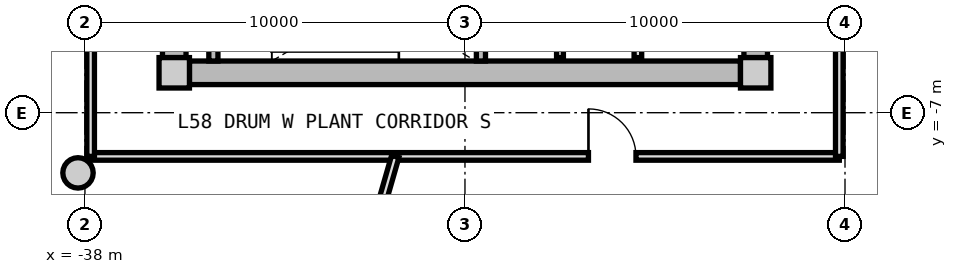
"""IFC4 building model, lengths in metres.
Left out: names, types, materials, properties, quantities, classifications, styles, units other than length and angle.
Written with IfcOpenShell. Run it as: python <this file> out.ifc"""

import sys

from ifc_helpers import new_model, si_unit, direction, frame, frame_2d, origin, origin_2d, place, context, subcontext, project, spatial, rectangle, circle, extrude, source, transform, mapped, element, fill, save


model = new_model("IFC4")
c1 = context("Model", 3, precision=1e-05, world=origin(), true_north=direction((0.0, 1.0)))
c2 = subcontext(c1, "Body", "Model", "MODEL_VIEW")
j1 = project(units=[si_unit("LENGTHUNIT", "METRE"), si_unit("PLANEANGLEUNIT", "RADIAN")], contexts=[c1])
p1 = place(None, origin())
s1 = spatial("IfcSite", under=j1, at=p1, CompositionType="ELEMENT")
p2 = place(p1, origin())
s2 = spatial("IfcBuilding", under=s1, at=p2, CompositionType="ELEMENT")
p3 = place(p2, frame((0.0, 0.0, 186.15)))
s3 = spatial("IfcBuildingStorey", under=s2, at=p3, CompositionType="ELEMENT", Elevation=186.15)
m1 = source(origin(), c2, "Body", "SweptSolid", [
    extrude(rectangle(XDim=0.8, YDim=0.8, at=origin_2d()), origin(), (0.0, 0.0, 1.0), 4.5),
])
for number, where, z_axis, x_axis in (
    (1, (-35.65, -5.95, 0.0), (0.0, 0.0, 1.0), (1.0, 0.0, 0.0)),
    (2, (-20.35, -5.95, 0.0), (0.0, 0.0, 1.0), (1.0, 0.0, 0.0)),
):
    element("IfcColumn", number, at=place(p3, frame(where, z_axis=z_axis, x_axis=x_axis)), inside=s3, PredefinedType="COLUMN", context=c2, shape_type="MappedRepresentation", body=[
        mapped(m1, transform((0.0, 0.0, 0.0), x_axis=(1.0, 0.0, 0.0), y_axis=(0.0, 1.0, 0.0), z_axis=(0.0, 0.0, 1.0), scale=1.0)),
    ])
m2 = source(origin(), c2, "Body", "SweptSolid", [
    extrude(rectangle(XDim=14.5, YDim=0.62, at=frame_2d((7.25, 0.0))), origin(), (0.0, 0.0, 1.0), 4.08),
])
p4 = place(p3, frame((-20.75, -5.95, 0.0), z_axis=(0.0, 0.0, 1.0), x_axis=(-1.0, 0.0, 0.0)))
e3 = element("IfcWall", 3, at=p4, inside=s3, PredefinedType="SHEAR", context=c2, shape_type="MappedRepresentation", body=[
    mapped(m2, transform((0.0, 0.0, 0.0), x_axis=(1.0, 0.0, 0.0), y_axis=(0.0, 1.0, 0.0), z_axis=(0.0, 0.0, 1.0), scale=1.0)),
])
m3 = source(origin(), c2, "Body", "SweptSolid", [
    extrude(rectangle(XDim=11.1, YDim=0.62, at=frame_2d((5.55, 0.0))), origin(), (0.0, 0.0, 1.0), 4.08),
])
p5 = place(p3, frame((-35.65, -5.55, 0.0), z_axis=(0.0, 0.0, 1.0), x_axis=(0.0, 1.0, 0.0)))
e4 = element("IfcWall", 4, at=p5, inside=s3, PredefinedType="SHEAR", context=c2, shape_type="MappedRepresentation", body=[
    mapped(m3, transform((0.0, 0.0, 0.0), x_axis=(1.0, 0.0, 0.0), y_axis=(0.0, 1.0, 0.0), z_axis=(0.0, 0.0, 1.0), scale=1.0)),
])
p6 = place(p5, frame((3.8, 0.0, 0.0)))
e5 = element("IfcOpeningElement", 5, at=p6, cuts=e4, PredefinedType="OPENING", context=c2, shape_type="SweptSolid", body=[
    extrude(rectangle(XDim=1.2, YDim=2.15, at=frame_2d((0.6, 1.075))), frame((0.0, 0.32, 0.0), z_axis=(0.0, -1.0, 0.0), x_axis=(1.0, 0.0, 0.0)), (0.0, 0.0, 1.0), 0.64),
])
p7 = place(p3, frame((-20.35, 5.55, 0.0), z_axis=(0.0, 0.0, 1.0), x_axis=(0.0, -1.0, 0.0)))
e6 = element("IfcWall", 6, at=p7, inside=s3, PredefinedType="SHEAR", context=c2, shape_type="MappedRepresentation", body=[
    mapped(m3, transform((0.0, 0.0, 0.0), x_axis=(1.0, 0.0, 0.0), y_axis=(0.0, 1.0, 0.0), z_axis=(0.0, 0.0, 1.0), scale=1.0)),
])
p8 = place(p7, frame((5.65, 0.0, 0.0)))
e7 = element("IfcOpeningElement", 7, at=p8, cuts=e6, PredefinedType="OPENING", context=c2, shape_type="SweptSolid", body=[
    extrude(rectangle(XDim=1.2, YDim=2.15, at=frame_2d((0.6, 1.075))), frame((0.0, 0.32, 0.0), z_axis=(0.0, -1.0, 0.0), x_axis=(1.0, 0.0, 0.0)), (0.0, 0.0, 1.0), 0.64),
])
p9 = place(p7, frame((9.3, 0.0, 0.0)))
e8 = element("IfcOpeningElement", 8, at=p9, cuts=e6, PredefinedType="OPENING", context=c2, shape_type="SweptSolid", body=[
    extrude(rectangle(XDim=1.0, YDim=2.1, at=frame_2d((0.5, 1.05))), frame((0.0, 0.32, 0.0), z_axis=(0.0, -1.0, 0.0), x_axis=(1.0, 0.0, 0.0)), (0.0, 0.0, 1.0), 0.64),
])
m4 = source(origin(), c2, "Body", "SweptSolid", [
    extrude(circle(Radius=0.4, at=origin_2d()), origin(), (0.0, 0.0, 1.0), 4.08),
])
p10 = place(p3, frame((-38.183, -8.584, 0.0), z_axis=(0.0, 0.0, 1.0), x_axis=(1.0, 0.0, 0.0)))
e9 = element("IfcColumn", 9, at=p10, inside=s3, PredefinedType="COLUMN", context=c2, shape_type="MappedRepresentation", body=[
    mapped(m4, transform((0.0, 0.0, 0.0), x_axis=(1.0, 0.0, 0.0), y_axis=(0.0, 1.0, 0.0), z_axis=(0.0, 0.0, 1.0), scale=1.0)),
])
m5 = source(origin(), c2, "Body", "SweptSolid", [
    extrude(rectangle(XDim=3.19, YDim=0.24, at=frame_2d((1.595, 0.0))), origin(), (0.0, 0.0, 1.0), 4.08),
])
for number, where, z_axis, x_axis in (
    (10, (-34.62, -5.64, 0.0), (0.0, 0.0, 1.0), (0.0, 1.0, 0.0)),
    (11, (-27.58, -5.64, 0.0), (0.0, 0.0, 1.0), (0.0, 1.0, 0.0)),
):
    element("IfcWall", number, at=place(p3, frame(where, z_axis=z_axis, x_axis=x_axis)), inside=s3, PredefinedType="PARTITIONING", context=c2, shape_type="MappedRepresentation", body=[
        mapped(m5, transform((0.0, 0.0, 0.0), x_axis=(1.0, 0.0, 0.0), y_axis=(0.0, 1.0, 0.0), z_axis=(0.0, 0.0, 1.0), scale=1.0)),
    ])
m6 = source(origin(), c2, "Body", "SweptSolid", [
    extrude(rectangle(XDim=3.8, YDim=0.2, at=frame_2d((1.9, 0.0))), origin(), (0.0, 0.0, 1.0), 4.065),
])
p11 = place(p3, frame((-23.45, -5.55, 0.0), z_axis=(0.0, 0.0, 1.0), x_axis=(0.0, 1.0, 0.0)))
e12 = element("IfcWall", 12, at=p11, inside=s3, PredefinedType="PARTITIONING", context=c2, shape_type="MappedRepresentation", body=[
    mapped(m6, transform((0.0, 0.0, 0.0), x_axis=(1.0, 0.0, 0.0), y_axis=(0.0, 1.0, 0.0), z_axis=(0.0, 0.0, 1.0), scale=1.0)),
])
m7 = source(origin(), c2, "Body", "SweptSolid", [
    extrude(rectangle(XDim=4.2, YDim=0.18, at=frame_2d((2.1, 0.0))), origin(), (0.0, 0.0, 1.0), 4.065),
])
p12 = place(p3, frame((-25.5, -5.55, 0.0), z_axis=(0.0, 0.0, 1.0), x_axis=(0.0, 1.0, 0.0)))
e13 = element("IfcWall", 13, at=p12, inside=s3, PredefinedType="PARTITIONING", context=c2, shape_type="MappedRepresentation", body=[
    mapped(m7, transform((0.0, 0.0, 0.0), x_axis=(1.0, 0.0, 0.0), y_axis=(0.0, 1.0, 0.0), z_axis=(0.0, 0.0, 1.0), scale=1.0)),
])
m8 = source(origin(), c2, "Body", "SweptSolid", [
    extrude(rectangle(XDim=19.7, YDim=0.2, at=frame_2d((9.85, 0.0))), origin(), (0.0, 0.0, 1.0), 4.065),
])
p13 = place(p3, frame((-18.15, -8.15, 0.0), z_axis=(0.0, 0.0, 1.0), x_axis=(-1.0, 0.0, 0.0)))
e14 = element("IfcWall", 14, at=p13, inside=s3, PredefinedType="PARTITIONING", context=c2, shape_type="MappedRepresentation", body=[
    mapped(m8, transform((0.0, 0.0, 0.0), x_axis=(1.0, 0.0, 0.0), y_axis=(0.0, 1.0, 0.0), z_axis=(0.0, 0.0, 1.0), scale=1.0)),
])
p14 = place(p13, frame((5.35, 0.0, 0.0)))
e15 = element("IfcOpeningElement", 15, at=p14, cuts=e14, PredefinedType="OPENING", context=c2, shape_type="SweptSolid", body=[
    extrude(rectangle(XDim=1.25, YDim=2.2, at=frame_2d((0.625, 1.1))), frame((0.0, 0.11, 0.0), z_axis=(0.0, -1.0, 0.0), x_axis=(1.0, 0.0, 0.0)), (0.0, 0.0, 1.0), 0.22),
])
m9 = source(origin(), c2, "Body", "SweptSolid", [
    extrude(rectangle(XDim=16.3, YDim=0.2, at=frame_2d((8.15, 0.0))), origin(), (0.0, 0.0, 1.0), 4.065),
])
p15 = place(p3, frame((-37.85, -8.15, 0.0), z_axis=(0.0, 0.0, 1.0), x_axis=(0.0, 1.0, 0.0)))
e16 = element("IfcWall", 16, at=p15, inside=s3, PredefinedType="PARTITIONING", context=c2, shape_type="MappedRepresentation", body=[
    mapped(m9, transform((0.0, 0.0, 0.0), x_axis=(1.0, 0.0, 0.0), y_axis=(0.0, 1.0, 0.0), z_axis=(0.0, 0.0, 1.0), scale=1.0)),
])
p16 = place(p15, frame((5.972, 0.0, 0.0)))
e17 = element("IfcOpeningElement", 17, at=p16, cuts=e16, PredefinedType="OPENING", context=c2, shape_type="SweptSolid", body=[
    extrude(rectangle(XDim=1.0, YDim=2.1, at=frame_2d((0.5, 1.05))), frame((0.0, 0.11, 0.0), z_axis=(0.0, -1.0, 0.0), x_axis=(1.0, 0.0, 0.0)), (0.0, 0.0, 1.0), 0.22),
])
p17 = place(p3, frame((-18.15, 8.15, 0.0), z_axis=(0.0, 0.0, 1.0), x_axis=(0.0, -1.0, 0.0)))
e18 = element("IfcWall", 18, at=p17, inside=s3, PredefinedType="PARTITIONING", context=c2, shape_type="MappedRepresentation", body=[
    mapped(m9, transform((0.0, 0.0, 0.0), x_axis=(1.0, 0.0, 0.0), y_axis=(0.0, 1.0, 0.0), z_axis=(0.0, 0.0, 1.0), scale=1.0)),
])
p18 = place(p17, frame((3.939, 0.0, 0.0)))
e19 = element("IfcOpeningElement", 19, at=p18, cuts=e18, PredefinedType="OPENING", context=c2, shape_type="SweptSolid", body=[
    extrude(rectangle(XDim=1.0, YDim=2.1, at=frame_2d((0.5, 1.05))), frame((0.0, 0.11, 0.0), z_axis=(0.0, -1.0, 0.0), x_axis=(1.0, 0.0, 0.0)), (0.0, 0.0, 1.0), 0.22),
])
m10 = source(origin(), c2, "Body", "SweptSolid", [
    extrude(rectangle(XDim=5.754, YDim=0.2, at=frame_2d((2.877, 0.0))), origin(), (0.0, 0.0, 1.0), 2.515),
])
p19 = place(p3, frame((-29.834, -8.15, 0.0), z_axis=(0.0, 0.0, 1.0), x_axis=(-0.276793809121, -0.960929335192, 0.0)))
e20 = element("IfcWall", 20, at=p19, inside=s3, PredefinedType="PARTITIONING", context=c2, shape_type="MappedRepresentation", body=[
    mapped(m10, transform((0.0, 0.0, 0.0), x_axis=(1.0, 0.0, 0.0), y_axis=(0.0, 1.0, 0.0), z_axis=(0.0, 0.0, 1.0), scale=1.0)),
])
m11 = source(origin(), c2, "Body", "SweptSolid", [
    extrude(rectangle(XDim=1.25, YDim=2.2, at=frame_2d((0.625, 1.1))), frame((0.0, 0.025, 0.0), z_axis=(0.0, -1.0, 0.0), x_axis=(1.0, 0.0, 0.0)), (0.0, 0.0, 1.0), 0.05),
])
p20 = place(p14, frame((1.25, 0.0, 0.0), z_axis=(0.0, 0.0, 1.0), x_axis=(-1.0, 0.0, 0.0)))
e21 = element("IfcDoor", 21, at=p20, inside=s3, OperationType="SINGLE_SWING_LEFT", PredefinedType="DOOR", context=c2, shape_type="MappedRepresentation", body=[
    mapped(m11, transform((0.0, 0.0, 0.0), x_axis=(1.0, 0.0, 0.0), y_axis=(0.0, 1.0, 0.0), z_axis=(0.0, 0.0, 1.0), scale=1.0)),
])
fill(e15, e21)
save(model, sys.argv[1])
